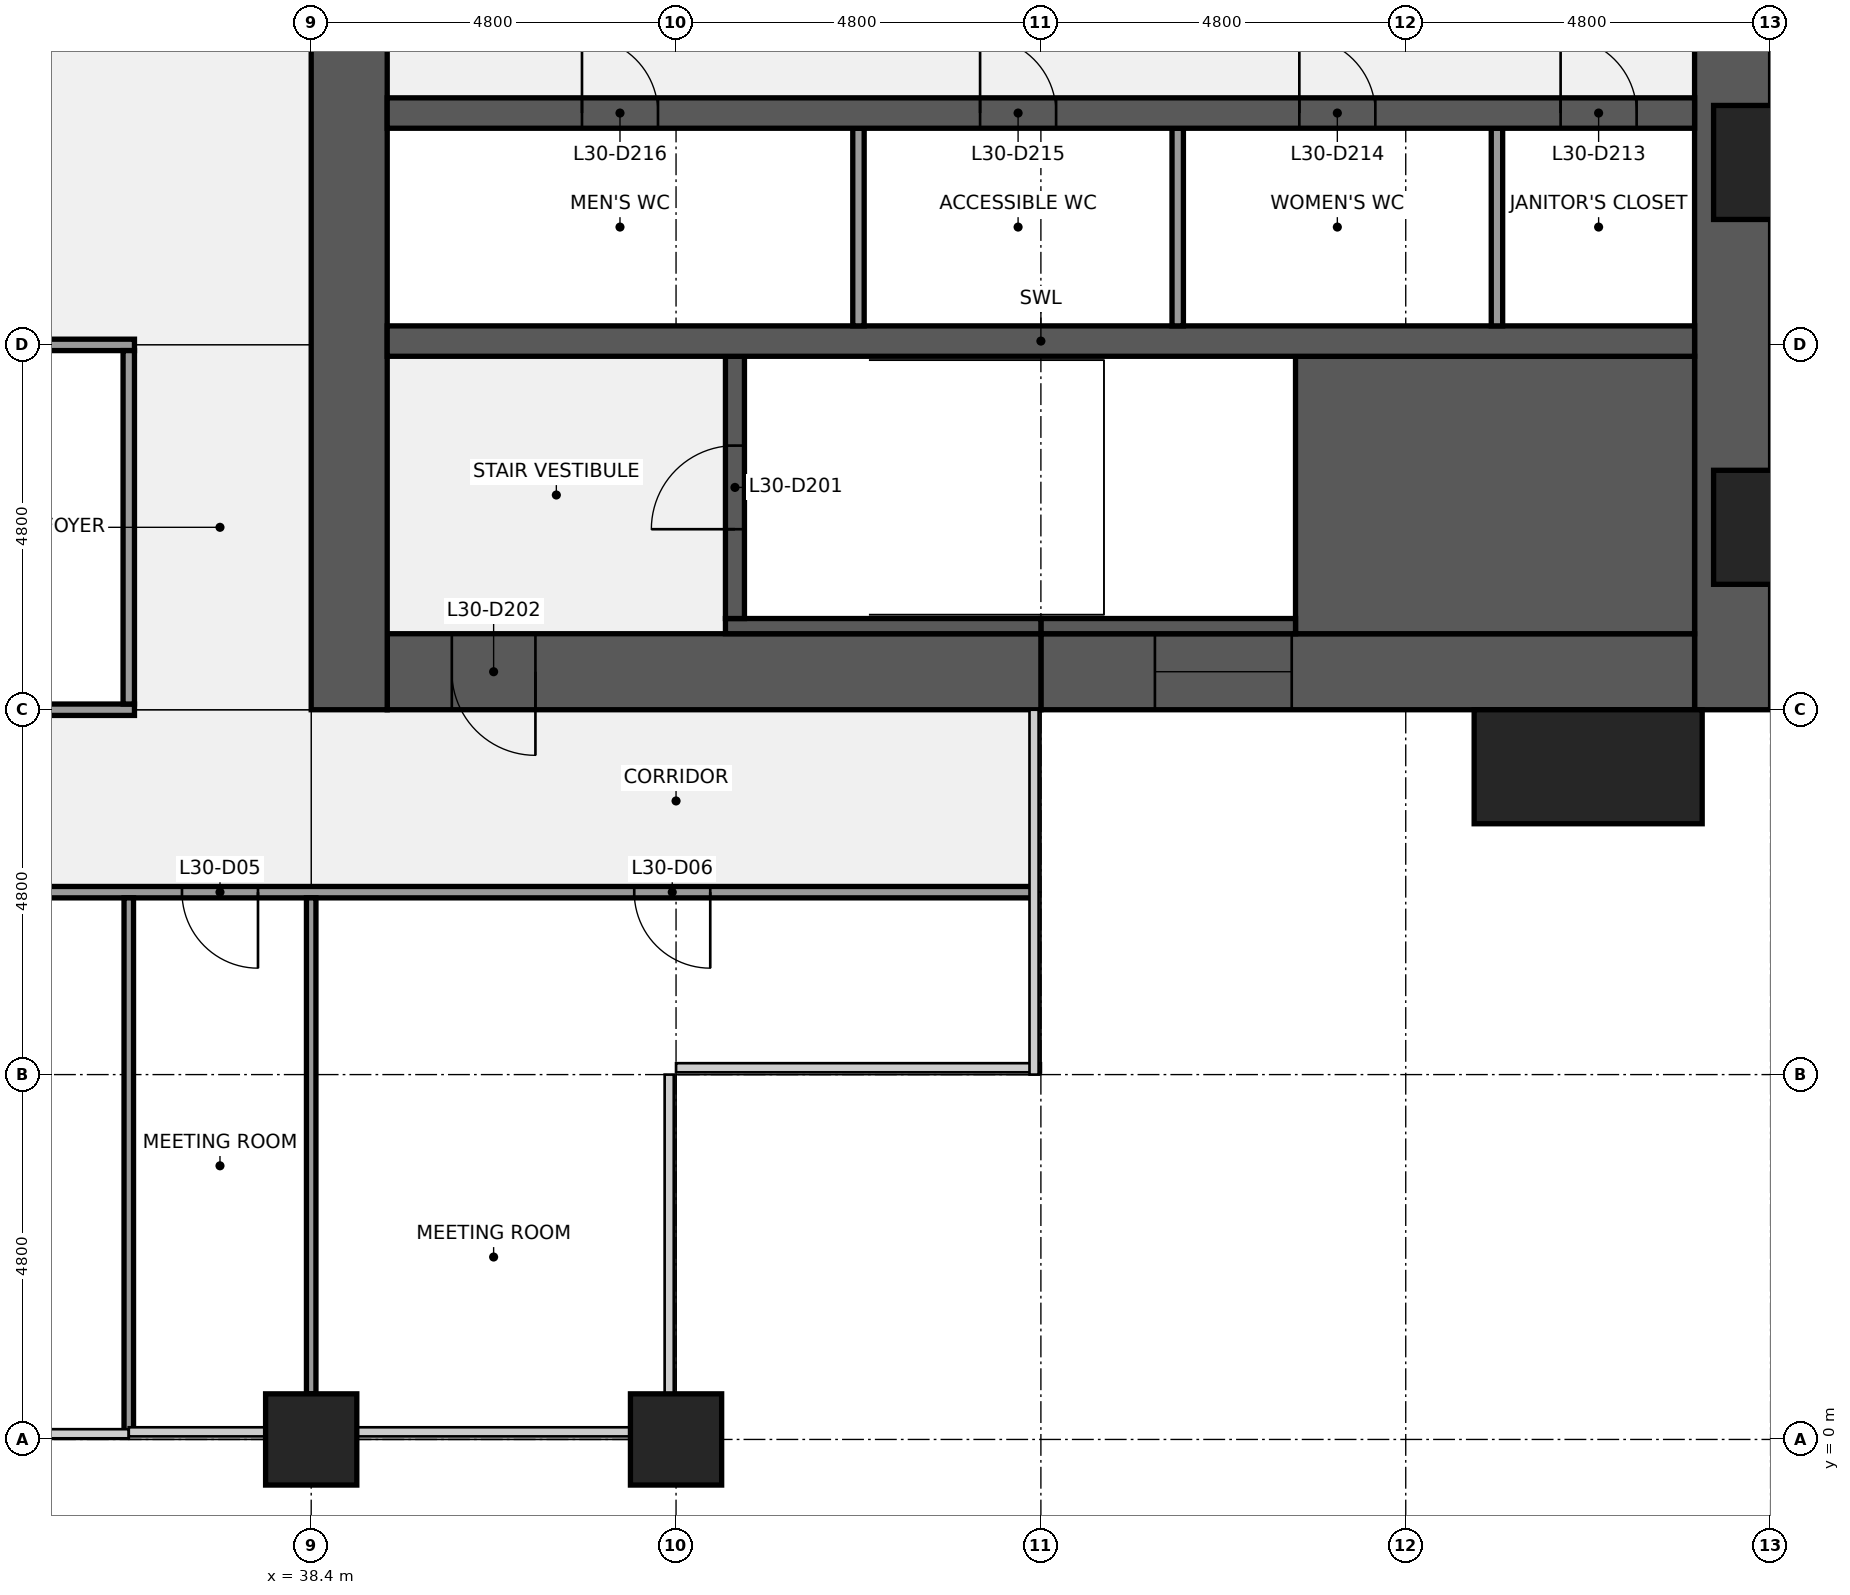
"""IFC4 building model, lengths in metres.
Left out: names, types, materials, properties, quantities, classifications, styles, units other than length and angle.
Written with IfcOpenShell. Run it as: python <this file> out.ifc"""

import sys

from ifc_helpers import new_model, si_unit, direction, frame, frame_2d, origin, origin_2d, place, context, subcontext, project, spatial, rectangle, extrude, element, fill, save


model = new_model("IFC4")
c1 = context("Model", 3, precision=1e-05, world=origin(), true_north=direction((0.0, 1.0)))
c2 = subcontext(c1, "Body", "Model", "MODEL_VIEW")
j1 = project(units=[si_unit("LENGTHUNIT", "METRE"), si_unit("PLANEANGLEUNIT", "RADIAN")], contexts=[c1])
p1 = place(None, origin())
s1 = spatial("IfcSite", under=j1, at=p1, CompositionType="ELEMENT")
p2 = place(p1, origin())
s2 = spatial("IfcBuilding", under=s1, at=p2, CompositionType="ELEMENT")
p3 = place(p2, frame((0.0, 0.0, 140.1)))
s3 = spatial("IfcBuildingStorey", under=s2, at=p3, CompositionType="ELEMENT", Elevation=140.1)
for number, where, z_axis, x_axis in (
    (1, (38.4, 0.0, 0.0), (0.0, 0.0, 1.0), (1.0, 0.0, 0.0)),
    (2, (43.2, 0.0, 0.0), (0.0, 0.0, 1.0), (1.0, 0.0, 0.0)),
):
    element("IfcColumn", number, at=place(p3, frame(where, z_axis=z_axis, x_axis=x_axis)), inside=s3, PredefinedType="COLUMN", context=c2, shape_type="SweptSolid", body=[
        extrude(rectangle(XDim=1.2, YDim=1.2, at=origin_2d()), origin(), (0.0, 0.0, 1.0), 4.0),
    ])
p4 = place(p3, frame((57.1, 38.4, 0.0), z_axis=(0.0, 0.0, 1.0), x_axis=(0.0, -1.0, 0.0)))
e3 = element("IfcWall", 3, at=p4, inside=s3, PredefinedType="SHEAR", context=c2, shape_type="SweptSolid", body=[
    extrude(rectangle(XDim=28.8, YDim=1.0, at=frame_2d((14.4, 0.0))), origin(), (0.0, 0.0, 1.0), 3.84),
])
p5 = place(p4, frame((18.45, 0.0, 0.9)))
e4 = element("IfcOpeningElement", 4, at=p5, cuts=e3, PredefinedType="OPENING", context=c2, shape_type="SweptSolid", body=[
    extrude(rectangle(XDim=1.5, YDim=1.5, at=frame_2d((0.75, 0.75))), frame((0.0, 0.51, 0.0), z_axis=(0.0, -1.0, 0.0), x_axis=(1.0, 0.0, 0.0)), (0.0, 0.0, 1.0), 1.02),
])
p6 = place(p4, frame((8.85, 0.0, 0.9)))
e5 = element("IfcOpeningElement", 5, at=p6, cuts=e3, PredefinedType="OPENING", context=c2, shape_type="SweptSolid", body=[
    extrude(rectangle(XDim=1.5, YDim=1.5, at=frame_2d((0.75, 0.75))), frame((0.0, 0.51, 0.0), z_axis=(0.0, -1.0, 0.0), x_axis=(1.0, 0.0, 0.0)), (0.0, 0.0, 1.0), 1.02),
])
p7 = place(p3, frame((56.6, 10.1, 0.0), z_axis=(0.0, 0.0, 1.0), x_axis=(-1.0, 0.0, 0.0)))
e6 = element("IfcWall", 6, at=p7, inside=s3, PredefinedType="SHEAR", context=c2, shape_type="SweptSolid", body=[
    extrude(rectangle(XDim=8.6, YDim=1.0, at=frame_2d((4.3, 0.0))), origin(), (0.0, 0.0, 1.0), 3.84),
])
p8 = place(p7, frame((5.3, 0.0, 0.9)))
e7 = element("IfcOpeningElement", 7, at=p8, cuts=e6, PredefinedType="OPENING", context=c2, shape_type="SweptSolid", body=[
    extrude(rectangle(XDim=1.8, YDim=1.5, at=frame_2d((0.9, 0.75))), frame((0.0, 0.51, 0.0), z_axis=(0.0, -1.0, 0.0), x_axis=(1.0, 0.0, 0.0)), (0.0, 0.0, 1.0), 1.02),
])
p9 = place(p3, frame((48.0, 10.1, 0.0), z_axis=(0.0, 0.0, 1.0), x_axis=(-1.0, 0.0, 0.0)))
e8 = element("IfcWall", 8, at=p9, inside=s3, PredefinedType="SHEAR", context=c2, shape_type="SweptSolid", body=[
    extrude(rectangle(XDim=8.6, YDim=1.0, at=frame_2d((4.3, 0.0))), origin(), (0.0, 0.0, 1.0), 3.84),
])
p10 = place(p9, frame((6.65, 0.0, 0.0)))
e9 = element("IfcOpeningElement", 9, at=p10, cuts=e8, PredefinedType="OPENING", context=c2, shape_type="SweptSolid", body=[
    extrude(rectangle(XDim=1.1, YDim=2.1, at=frame_2d((0.55, 1.05))), frame((0.0, 0.51, 0.0), z_axis=(0.0, -1.0, 0.0), x_axis=(1.0, 0.0, 0.0)), (0.0, 0.0, 1.0), 1.02),
])
p11 = place(p3, frame((38.9, 9.6, 0.0), z_axis=(0.0, 0.0, 1.0), x_axis=(0.0, 1.0, 0.0)))
e10 = element("IfcWall", 10, at=p11, inside=s3, PredefinedType="SHEAR", context=c2, shape_type="SweptSolid", body=[
    extrude(rectangle(XDim=28.8, YDim=1.0, at=frame_2d((14.4, 0.0))), origin(), (0.0, 0.0, 1.0), 3.84),
])
p12 = place(p11, frame((8.7, 0.0, 0.0)))
e11 = element("IfcOpeningElement", 11, at=p12, cuts=e10, PredefinedType="OPENING", context=c2, shape_type="SweptSolid", body=[
    extrude(rectangle(XDim=1.8, YDim=2.1, at=frame_2d((0.9, 1.05))), frame((0.0, 0.51, 0.0), z_axis=(0.0, -1.0, 0.0), x_axis=(1.0, 0.0, 0.0)), (0.0, 0.0, 1.0), 1.02),
])
p13 = place(p11, frame((18.3, 0.0, 0.0)))
e12 = element("IfcOpeningElement", 12, at=p13, cuts=e10, PredefinedType="OPENING", context=c2, shape_type="SweptSolid", body=[
    extrude(rectangle(XDim=1.8, YDim=2.1, at=frame_2d((0.9, 1.05))), frame((0.0, 0.51, 0.0), z_axis=(0.0, -1.0, 0.0), x_axis=(1.0, 0.0, 0.0)), (0.0, 0.0, 1.0), 1.02),
])
p14 = place(p3, frame((51.35, 12.425, 0.0), z_axis=(0.0, 0.0, 1.0), x_axis=(1.0, 0.0, 0.0)))
e13 = element("IfcWall", 13, at=p14, inside=s3, PredefinedType="SHEAR", context=c2, shape_type="SweptSolid", body=[
    extrude(rectangle(XDim=5.25, YDim=3.65, at=frame_2d((2.625, 0.0))), origin(), (0.0, 0.0, 1.0), 3.84),
])
p15 = place(p3, frame((48.0, 10.7, 0.0), z_axis=(0.0, 0.0, 1.0), x_axis=(1.0, 0.0, 0.0)))
e14 = element("IfcWall", 14, at=p15, inside=s3, PredefinedType="SHEAR", context=c2, shape_type="SweptSolid", body=[
    extrude(rectangle(XDim=3.35, YDim=0.2, at=frame_2d((1.675, 0.0))), origin(), (0.0, 0.0, 1.0), 3.84),
])
p16 = place(p3, frame((43.85, 10.7, 0.0), z_axis=(0.0, 0.0, 1.0), x_axis=(1.0, 0.0, 0.0)))
e15 = element("IfcWall", 15, at=p16, inside=s3, PredefinedType="SHEAR", context=c2, shape_type="SweptSolid", body=[
    extrude(rectangle(XDim=4.15, YDim=0.2, at=frame_2d((2.075, 0.0))), origin(), (0.0, 0.0, 1.0), 3.84),
])
p17 = place(p3, frame((43.975, 10.8, 0.0), z_axis=(0.0, 0.0, 1.0), x_axis=(0.0, 1.0, 0.0)))
e16 = element("IfcWall", 16, at=p17, inside=s3, PredefinedType="SHEAR", context=c2, shape_type="SweptSolid", body=[
    extrude(rectangle(XDim=3.45, YDim=0.25, at=frame_2d((1.725, 0.0))), origin(), (0.0, 0.0, 1.0), 3.84),
])
p18 = place(p17, frame((1.175, 0.0, 0.0)))
e17 = element("IfcOpeningElement", 17, at=p18, cuts=e16, PredefinedType="OPENING", context=c2, shape_type="SweptSolid", body=[
    extrude(rectangle(XDim=1.1, YDim=2.1, at=frame_2d((0.55, 1.05))), frame((0.0, 0.135, 0.0), z_axis=(0.0, -1.0, 0.0), x_axis=(1.0, 0.0, 0.0)), (0.0, 0.0, 1.0), 0.27),
])
p19 = place(p3, frame((39.4, 14.45, 0.0), z_axis=(0.0, 0.0, 1.0), x_axis=(1.0, 0.0, 0.0)))
e18 = element("IfcWall", 18, at=p19, inside=s3, PredefinedType="SHEAR", context=c2, shape_type="SweptSolid", body=[
    extrude(rectangle(XDim=17.2, YDim=0.4, at=frame_2d((8.6, 0.0))), origin(), (0.0, 0.0, 1.0), 3.84),
])
for number, where, z_axis, x_axis in (
    (19, (54.0, 14.65, 0.0), (0.0, 0.0, 1.0), (0.0, 1.0, 0.0)),
    (20, (49.8, 14.65, 0.0), (0.0, 0.0, 1.0), (0.0, 1.0, 0.0)),
    (21, (45.6, 14.65, 0.0), (0.0, 0.0, 1.0), (0.0, 1.0, 0.0)),
):
    element("IfcWall", number, at=place(p3, frame(where, z_axis=z_axis, x_axis=x_axis)), inside=s3, PredefinedType="PARTITIONING", context=c2, shape_type="SweptSolid", body=[
        extrude(rectangle(XDim=2.6, YDim=0.15, at=frame_2d((1.3, 0.0))), origin(), (0.0, 0.0, 1.0), 3.84),
    ])
p20 = place(p3, frame((39.4, 17.45, 0.0), z_axis=(0.0, 0.0, 1.0), x_axis=(1.0, 0.0, 0.0)))
e22 = element("IfcWall", 22, at=p20, inside=s3, PredefinedType="SHEAR", context=c2, shape_type="SweptSolid", body=[
    extrude(rectangle(XDim=17.2, YDim=0.4, at=frame_2d((8.6, 0.0))), origin(), (0.0, 0.0, 1.0), 3.84),
])
p21 = place(p20, frame((15.438, 0.0, 0.0)))
e23 = element("IfcOpeningElement", 23, at=p21, cuts=e22, PredefinedType="OPENING", context=c2, shape_type="SweptSolid", body=[
    extrude(rectangle(XDim=1.0, YDim=2.1, at=frame_2d((0.5, 1.05))), frame((0.0, 0.21, 0.0), z_axis=(0.0, -1.0, 0.0), x_axis=(1.0, 0.0, 0.0)), (0.0, 0.0, 1.0), 0.42),
])
p22 = place(p20, frame((12.0, 0.0, 0.0)))
e24 = element("IfcOpeningElement", 24, at=p22, cuts=e22, PredefinedType="OPENING", context=c2, shape_type="SweptSolid", body=[
    extrude(rectangle(XDim=1.0, YDim=2.1, at=frame_2d((0.5, 1.05))), frame((0.0, 0.21, 0.0), z_axis=(0.0, -1.0, 0.0), x_axis=(1.0, 0.0, 0.0)), (0.0, 0.0, 1.0), 0.42),
])
p23 = place(p20, frame((7.8, 0.0, 0.0)))
e25 = element("IfcOpeningElement", 25, at=p23, cuts=e22, PredefinedType="OPENING", context=c2, shape_type="SweptSolid", body=[
    extrude(rectangle(XDim=1.0, YDim=2.1, at=frame_2d((0.5, 1.05))), frame((0.0, 0.21, 0.0), z_axis=(0.0, -1.0, 0.0), x_axis=(1.0, 0.0, 0.0)), (0.0, 0.0, 1.0), 0.42),
])
p24 = place(p20, frame((2.562, 0.0, 0.0)))
e26 = element("IfcOpeningElement", 26, at=p24, cuts=e22, PredefinedType="OPENING", context=c2, shape_type="SweptSolid", body=[
    extrude(rectangle(XDim=1.0, YDim=2.1, at=frame_2d((0.5, 1.05))), frame((0.0, 0.21, 0.0), z_axis=(0.0, -1.0, 0.0), x_axis=(1.0, 0.0, 0.0)), (0.0, 0.0, 1.0), 0.42),
])
p25 = place(p3, frame((9.7, 7.2, 0.0), z_axis=(0.0, 0.0, 1.0), x_axis=(1.0, 0.0, 0.0)))
e27 = element("IfcWall", 27, at=p25, inside=s3, PredefinedType="PARTITIONING", context=c2, shape_type="SweptSolid", body=[
    extrude(rectangle(XDim=38.2, YDim=0.15, at=frame_2d((19.1, 0.0))), origin(), (0.0, 0.0, 1.0), 2.936),
])
p26 = place(p25, frame((0.65, 0.0, 0.0)))
e28 = element("IfcOpeningElement", 28, at=p26, cuts=e27, PredefinedType="OPENING", context=c2, shape_type="SweptSolid", body=[
    extrude(rectangle(XDim=1.0, YDim=2.1, at=frame_2d((0.5, 1.05))), frame((0.0, 0.085, 0.0), z_axis=(0.0, -1.0, 0.0), x_axis=(1.0, 0.0, 0.0)), (0.0, 0.0, 1.0), 0.17),
])
p27 = place(p25, frame((13.8, 0.0, 0.0)))
e29 = element("IfcOpeningElement", 29, at=p27, cuts=e27, PredefinedType="OPENING", context=c2, shape_type="SweptSolid", body=[
    extrude(rectangle(XDim=1.0, YDim=2.1, at=frame_2d((0.5, 1.05))), frame((0.0, 0.085, 0.0), z_axis=(0.0, -1.0, 0.0), x_axis=(1.0, 0.0, 0.0)), (0.0, 0.0, 1.0), 0.17),
])
p28 = place(p25, frame((19.8, 0.0, 0.0)))
e30 = element("IfcOpeningElement", 30, at=p28, cuts=e27, PredefinedType="OPENING", context=c2, shape_type="SweptSolid", body=[
    extrude(rectangle(XDim=1.0, YDim=2.1, at=frame_2d((0.5, 1.05))), frame((0.0, 0.085, 0.0), z_axis=(0.0, -1.0, 0.0), x_axis=(1.0, 0.0, 0.0)), (0.0, 0.0, 1.0), 0.17),
])
p29 = place(p25, frame((23.4, 0.0, 0.0)))
e31 = element("IfcOpeningElement", 31, at=p29, cuts=e27, PredefinedType="OPENING", context=c2, shape_type="SweptSolid", body=[
    extrude(rectangle(XDim=1.0, YDim=2.1, at=frame_2d((0.5, 1.05))), frame((0.0, 0.085, 0.0), z_axis=(0.0, -1.0, 0.0), x_axis=(1.0, 0.0, 0.0)), (0.0, 0.0, 1.0), 0.17),
])
p30 = place(p25, frame((27.0, 0.0, 0.0)))
e32 = element("IfcOpeningElement", 32, at=p30, cuts=e27, PredefinedType="OPENING", context=c2, shape_type="SweptSolid", body=[
    extrude(rectangle(XDim=1.0, YDim=2.1, at=frame_2d((0.5, 1.05))), frame((0.0, 0.085, 0.0), z_axis=(0.0, -1.0, 0.0), x_axis=(1.0, 0.0, 0.0)), (0.0, 0.0, 1.0), 0.17),
])
p31 = place(p25, frame((32.95, 0.0, 0.0)))
e33 = element("IfcOpeningElement", 33, at=p31, cuts=e27, PredefinedType="OPENING", context=c2, shape_type="SweptSolid", body=[
    extrude(rectangle(XDim=1.0, YDim=2.1, at=frame_2d((0.5, 1.05))), frame((0.0, 0.085, 0.0), z_axis=(0.0, -1.0, 0.0), x_axis=(1.0, 0.0, 0.0)), (0.0, 0.0, 1.0), 0.17),
])
p32 = place(p3, frame((21.525, 9.6, 0.0), z_axis=(0.0, 0.0, 1.0), x_axis=(1.0, 0.0, 0.0)))
e34 = element("IfcWall", 34, at=p32, inside=s3, PredefinedType="PARTITIONING", context=c2, shape_type="SweptSolid", body=[
    extrude(rectangle(XDim=14.55, YDim=0.15, at=frame_2d((7.275, 0.0))), origin(), (0.0, 0.0, 1.0), 2.936),
])
p33 = place(p32, frame((3.175, 0.0, 0.0)))
e35 = element("IfcOpeningElement", 35, at=p33, cuts=e34, PredefinedType="OPENING", context=c2, shape_type="SweptSolid", body=[
    extrude(rectangle(XDim=1.0, YDim=2.1, at=frame_2d((0.5, 1.05))), frame((0.0, 0.085, 0.0), z_axis=(0.0, -1.0, 0.0), x_axis=(1.0, 0.0, 0.0)), (0.0, 0.0, 1.0), 0.17),
])
p34 = place(p32, frame((10.375, 0.0, 0.0)))
e36 = element("IfcOpeningElement", 36, at=p34, cuts=e34, PredefinedType="OPENING", context=c2, shape_type="SweptSolid", body=[
    extrude(rectangle(XDim=1.0, YDim=2.1, at=frame_2d((0.5, 1.05))), frame((0.0, 0.085, 0.0), z_axis=(0.0, -1.0, 0.0), x_axis=(1.0, 0.0, 0.0)), (0.0, 0.0, 1.0), 0.17),
])
p35 = place(p3, frame((33.675, 14.4, 0.0), z_axis=(0.0, 0.0, 1.0), x_axis=(1.0, 0.0, 0.0)))
e37 = element("IfcWall", 37, at=p35, inside=s3, PredefinedType="PARTITIONING", context=c2, shape_type="SweptSolid", body=[
    extrude(rectangle(XDim=2.4, YDim=0.15, at=frame_2d((1.2, 0.0))), origin(), (0.0, 0.0, 1.0), 2.936),
])
p36 = place(p3, frame((36.0, 0.1, 0.0), z_axis=(0.0, 0.0, 1.0), x_axis=(0.0, 1.0, 0.0)))
e38 = element("IfcWall", 38, at=p36, inside=s3, PredefinedType="PARTITIONING", context=c2, shape_type="SweptSolid", body=[
    extrude(rectangle(XDim=7.025, YDim=0.125, at=frame_2d((3.512, 0.0))), origin(), (0.0, 0.0, 1.0), 2.936),
])
p37 = place(p3, frame((36.0, 9.675, 0.0), z_axis=(0.0, 0.0, 1.0), x_axis=(0.0, 1.0, 0.0)))
e39 = element("IfcWall", 39, at=p37, inside=s3, PredefinedType="PARTITIONING", context=c2, shape_type="SweptSolid", body=[
    extrude(rectangle(XDim=4.65, YDim=0.15, at=frame_2d((2.325, 0.0))), origin(), (0.0, 0.0, 1.0), 2.936),
])
p38 = place(p3, frame((38.4, 0.6, 0.0), z_axis=(0.0, 0.0, 1.0), x_axis=(0.0, 1.0, 0.0)))
e40 = element("IfcWall", 40, at=p38, inside=s3, PredefinedType="PARTITIONING", context=c2, shape_type="SweptSolid", body=[
    extrude(rectangle(XDim=6.525, YDim=0.125, at=frame_2d((3.262, 0.0))), origin(), (0.0, 0.0, 1.0), 2.936),
])
p39 = place(p3, frame((55.2, 8.85, 0.0), z_axis=(0.0, 0.0, 1.0), x_axis=(1.0, 0.0, 0.0)))
e41 = element("IfcColumn", 41, at=p39, inside=s3, PredefinedType="PILASTER", context=c2, shape_type="SweptSolid", body=[
    extrude(rectangle(XDim=3.0, YDim=1.5, at=origin_2d()), origin(), (0.0, 0.0, 1.0), 4.0),
])
for number, where, z_axis, x_axis in (
    (42, (38.4, -1.05, 0.0), (0.0, 0.0, 1.0), (1.0, 0.0, 0.0)),
    (43, (43.2, -1.05, 0.0), (0.0, 0.0, 1.0), (1.0, 0.0, 0.0)),
):
    element("IfcColumn", number, at=place(p3, frame(where, z_axis=z_axis, x_axis=x_axis)), inside=s3, PredefinedType="PILASTER", context=c2, shape_type="SweptSolid", body=[
        extrude(rectangle(XDim=3.6, YDim=0.9, at=origin_2d()), origin(), (0.0, 0.0, 1.0), 4.0),
    ])
p40 = place(p18, origin())
e44 = element("IfcDoor", 44, at=p40, inside=s3, OperationType="SINGLE_SWING_LEFT", PredefinedType="DOOR", context=c2, shape_type="SweptSolid", body=[
    extrude(rectangle(XDim=1.1, YDim=2.1, at=frame_2d((0.55, 1.05))), frame((0.0, 0.025, 0.0), z_axis=(0.0, -1.0, 0.0), x_axis=(1.0, 0.0, 0.0)), (0.0, 0.0, 1.0), 0.05),
])
fill(e17, e44)
p41 = place(p10, origin())
e45 = element("IfcDoor", 45, at=p41, inside=s3, OperationType="SINGLE_SWING_LEFT", PredefinedType="DOOR", context=c2, shape_type="SweptSolid", body=[
    extrude(rectangle(XDim=1.1, YDim=2.1, at=frame_2d((0.55, 1.05))), frame((0.0, 0.025, 0.0), z_axis=(0.0, -1.0, 0.0), x_axis=(1.0, 0.0, 0.0)), (0.0, 0.0, 1.0), 0.05),
])
fill(e9, e45)
p42 = place(p21, origin())
e46 = element("IfcDoor", 46, at=p42, inside=s3, OperationType="SINGLE_SWING_LEFT", PredefinedType="DOOR", context=c2, shape_type="SweptSolid", body=[
    extrude(rectangle(XDim=1.0, YDim=2.1, at=frame_2d((0.5, 1.05))), frame((0.0, 0.025, 0.0), z_axis=(0.0, -1.0, 0.0), x_axis=(1.0, 0.0, 0.0)), (0.0, 0.0, 1.0), 0.05),
])
fill(e23, e46)
p43 = place(p22, origin())
e47 = element("IfcDoor", 47, at=p43, inside=s3, OperationType="SINGLE_SWING_LEFT", PredefinedType="DOOR", context=c2, shape_type="SweptSolid", body=[
    extrude(rectangle(XDim=1.0, YDim=2.1, at=frame_2d((0.5, 1.05))), frame((0.0, 0.025, 0.0), z_axis=(0.0, -1.0, 0.0), x_axis=(1.0, 0.0, 0.0)), (0.0, 0.0, 1.0), 0.05),
])
fill(e24, e47)
p44 = place(p23, origin())
e48 = element("IfcDoor", 48, at=p44, inside=s3, OperationType="SINGLE_SWING_LEFT", PredefinedType="DOOR", context=c2, shape_type="SweptSolid", body=[
    extrude(rectangle(XDim=1.0, YDim=2.1, at=frame_2d((0.5, 1.05))), frame((0.0, 0.025, 0.0), z_axis=(0.0, -1.0, 0.0), x_axis=(1.0, 0.0, 0.0)), (0.0, 0.0, 1.0), 0.05),
])
fill(e25, e48)
p45 = place(p24, origin())
e49 = element("IfcDoor", 49, at=p45, inside=s3, OperationType="SINGLE_SWING_LEFT", PredefinedType="DOOR", context=c2, shape_type="SweptSolid", body=[
    extrude(rectangle(XDim=1.0, YDim=2.1, at=frame_2d((0.5, 1.05))), frame((0.0, 0.025, 0.0), z_axis=(0.0, -1.0, 0.0), x_axis=(1.0, 0.0, 0.0)), (0.0, 0.0, 1.0), 0.05),
])
fill(e26, e49)
p46 = place(p8, origin())
e50 = element("IfcWindow", 50, at=p46, inside=s3, PartitioningType="SINGLE_PANEL", PredefinedType="WINDOW", context=c2, shape_type="SweptSolid", body=[
    extrude(rectangle(XDim=1.8, YDim=1.5, at=frame_2d((0.9, 0.75))), frame((0.0, 0.03, 0.0), z_axis=(0.0, -1.0, 0.0), x_axis=(1.0, 0.0, 0.0)), (0.0, 0.0, 1.0), 0.06),
])
fill(e7, e50)
p47 = place(p30, origin())
e51 = element("IfcDoor", 51, at=p47, inside=s3, OperationType="SINGLE_SWING_RIGHT", PredefinedType="DOOR", context=c2, shape_type="SweptSolid", body=[
    extrude(rectangle(XDim=1.0, YDim=2.1, at=frame_2d((0.5, 1.05))), frame((0.0, 0.025, 0.0), z_axis=(0.0, -1.0, 0.0), x_axis=(1.0, 0.0, 0.0)), (0.0, 0.0, 1.0), 0.05),
])
fill(e32, e51)
p48 = place(p31, origin())
e52 = element("IfcDoor", 52, at=p48, inside=s3, OperationType="SINGLE_SWING_RIGHT", PredefinedType="DOOR", context=c2, shape_type="SweptSolid", body=[
    extrude(rectangle(XDim=1.0, YDim=2.1, at=frame_2d((0.5, 1.05))), frame((0.0, 0.025, 0.0), z_axis=(0.0, -1.0, 0.0), x_axis=(1.0, 0.0, 0.0)), (0.0, 0.0, 1.0), 0.05),
])
fill(e33, e52)
save(model, sys.argv[1])
